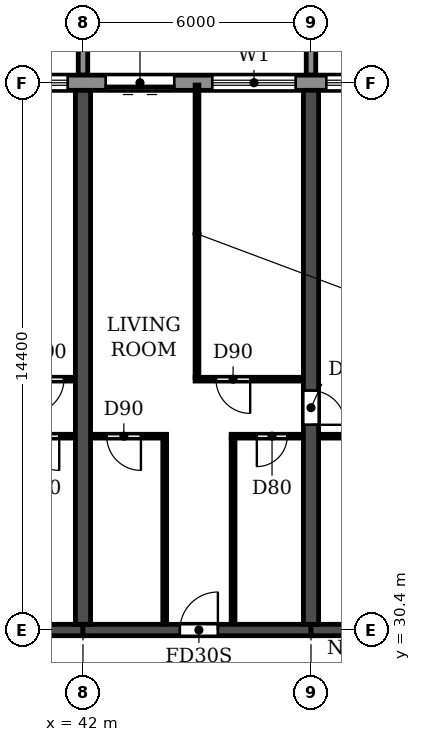
"""IFC4 building model, lengths in metres.
Left out: names, types, materials, properties, quantities, classifications, styles, units other than length and angle.
Written with IfcOpenShell. Run it as: python <this file> out.ifc"""

import sys

from ifc_helpers import new_model, si_unit, direction, frame, frame_2d, origin, place, context, subcontext, project, spatial, polyline, rectangle, outline, extrude, source, transform, mapped, element, fill, save


model = new_model("IFC4")
c1 = context("Model", 3, precision=1e-05, world=origin(), true_north=direction((0.0, 1.0)))
c2 = subcontext(c1, "Body", "Model", "MODEL_VIEW")
j1 = project(units=[si_unit("LENGTHUNIT", "METRE"), si_unit("PLANEANGLEUNIT", "RADIAN")], contexts=[c1])
p1 = place(None, origin())
s1 = spatial("IfcSite", under=j1, at=p1, CompositionType="ELEMENT")
p2 = place(p1, origin())
s2 = spatial("IfcBuilding", under=s1, at=p2, CompositionType="ELEMENT")
p3 = place(p2, frame((0.0, 0.0, 56.4)))
s3 = spatial("IfcBuildingStorey", under=s2, at=p3, CompositionType="ELEMENT", Elevation=56.4)
p4 = place(p3, frame((42.0, 30.55, 0.0), z_axis=(0.0, 0.0, 1.0), x_axis=(0.0, 1.0, 0.0)))
e1 = element("IfcWall", 1, at=p4, inside=s3, PredefinedType="SHEAR", context=c2, shape_type="SweptSolid", body=[
    extrude(rectangle(XDim=14.05, YDim=0.4, at=frame_2d((7.025, 0.0))), origin(), (0.0, 0.0, 1.0), 3.05),
])
p5 = place(p3, frame((48.0, 30.55, 0.0), z_axis=(0.0, 0.0, 1.0), x_axis=(0.0, 1.0, 0.0)))
e2 = element("IfcWall", 2, at=p5, inside=s3, PredefinedType="SHEAR", context=c2, shape_type="SweptSolid", body=[
    extrude(rectangle(XDim=14.05, YDim=0.4, at=frame_2d((7.025, 0.0))), origin(), (0.0, 0.0, 1.0), 3.05),
])
p6 = place(p5, frame((5.25, 0.0, 0.0)))
e3 = element("IfcOpeningElement", 3, at=p6, cuts=e2, PredefinedType="OPENING", context=c2, shape_type="SweptSolid", body=[
    extrude(rectangle(XDim=0.9, YDim=2.1, at=frame_2d((0.45, 1.05))), frame((0.0, 0.21, 0.0), z_axis=(0.0, -1.0, 0.0), x_axis=(1.0, 0.0, 0.0)), (0.0, 0.0, 1.0), 0.42),
])
p7 = place(p3, frame((36.0, 30.4, 0.0), z_axis=(0.0, 0.0, 1.0), x_axis=(1.0, 0.0, 0.0)))
e4 = element("IfcWall", 4, at=p7, inside=s3, PredefinedType="SHEAR", context=c2, shape_type="SweptSolid", body=[
    extrude(rectangle(XDim=6.0, YDim=0.3, at=frame_2d((3.0, 0.0))), origin(), (0.0, 0.0, 1.0), 2.45),
])
p8 = place(p7, frame((2.45, 0.0, 0.0)))
e5 = element("IfcOpeningElement", 5, at=p8, cuts=e4, PredefinedType="OPENING", context=c2, shape_type="SweptSolid", body=[
    extrude(rectangle(XDim=1.0, YDim=2.1, at=frame_2d((0.5, 1.05))), frame((0.0, 0.16, 0.0), z_axis=(0.0, -1.0, 0.0), x_axis=(1.0, 0.0, 0.0)), (0.0, 0.0, 1.0), 0.32),
])
p9 = place(p3, frame((42.0, 30.4, 0.0), z_axis=(0.0, 0.0, 1.0), x_axis=(1.0, 0.0, 0.0)))
e6 = element("IfcWall", 6, at=p9, inside=s3, PredefinedType="SHEAR", context=c2, shape_type="SweptSolid", body=[
    extrude(rectangle(XDim=6.0, YDim=0.3, at=frame_2d((3.0, 0.0))), origin(), (0.0, 0.0, 1.0), 2.45),
])
p10 = place(p9, frame((2.55, 0.0, 0.0)))
e7 = element("IfcOpeningElement", 7, at=p10, cuts=e6, PredefinedType="OPENING", context=c2, shape_type="SweptSolid", body=[
    extrude(rectangle(XDim=1.0, YDim=2.1, at=frame_2d((0.5, 1.05))), frame((0.0, 0.16, 0.0), z_axis=(0.0, -1.0, 0.0), x_axis=(1.0, 0.0, 0.0)), (0.0, 0.0, 1.0), 0.32),
])
p11 = place(p3, frame((48.0, 30.4, 0.0), z_axis=(0.0, 0.0, 1.0), x_axis=(1.0, 0.0, 0.0)))
e8 = element("IfcWall", 8, at=p11, inside=s3, PredefinedType="SHEAR", context=c2, shape_type="SweptSolid", body=[
    extrude(rectangle(XDim=6.0, YDim=0.3, at=frame_2d((3.0, 0.0))), origin(), (0.0, 0.0, 1.0), 2.45),
])
p12 = place(p3, frame((91.317, 44.8, 0.0), z_axis=(0.0, 0.0, 1.0), x_axis=(-1.0, 0.0, 0.0)))
e9 = element("IfcWall", 9, at=p12, inside=s3, PredefinedType="STANDARD", context=c2, shape_type="SweptSolid", body=[
    extrude(rectangle(XDim=80.634, YDim=0.4, at=frame_2d((40.317, 0.0))), origin(), (0.0, 0.0, 1.0), 3.05),
])
p13 = place(p12, frame((76.717, 0.0, 0.9)))
e10 = element("IfcOpeningElement", 10, at=p13, cuts=e9, PredefinedType="OPENING", context=c2, shape_type="SweptSolid", body=[
    extrude(rectangle(XDim=2.2, YDim=1.5, at=frame_2d((1.1, 0.75))), frame((0.0, 0.21, 0.0), z_axis=(0.0, -1.0, 0.0), x_axis=(1.0, 0.0, 0.0)), (0.0, 0.0, 1.0), 0.42),
])
p14 = place(p12, frame((73.917, 0.0, 0.0)))
e11 = element("IfcOpeningElement", 11, at=p14, cuts=e9, PredefinedType="OPENING", context=c2, shape_type="SweptSolid", body=[
    extrude(rectangle(XDim=1.8, YDim=2.4, at=frame_2d((0.9, 1.2))), frame((0.0, 0.21, 0.0), z_axis=(0.0, -1.0, 0.0), x_axis=(1.0, 0.0, 0.0)), (0.0, 0.0, 1.0), 0.42),
])
p15 = place(p12, frame((70.717, 0.0, 0.9)))
e12 = element("IfcOpeningElement", 12, at=p15, cuts=e9, PredefinedType="OPENING", context=c2, shape_type="SweptSolid", body=[
    extrude(rectangle(XDim=2.2, YDim=1.5, at=frame_2d((1.1, 0.75))), frame((0.0, 0.21, 0.0), z_axis=(0.0, -1.0, 0.0), x_axis=(1.0, 0.0, 0.0)), (0.0, 0.0, 1.0), 0.42),
])
p16 = place(p12, frame((67.917, 0.0, 0.0)))
e13 = element("IfcOpeningElement", 13, at=p16, cuts=e9, PredefinedType="OPENING", context=c2, shape_type="SweptSolid", body=[
    extrude(rectangle(XDim=1.8, YDim=2.4, at=frame_2d((0.9, 1.2))), frame((0.0, 0.21, 0.0), z_axis=(0.0, -1.0, 0.0), x_axis=(1.0, 0.0, 0.0)), (0.0, 0.0, 1.0), 0.42),
])
p17 = place(p12, frame((64.717, 0.0, 0.9)))
e14 = element("IfcOpeningElement", 14, at=p17, cuts=e9, PredefinedType="OPENING", context=c2, shape_type="SweptSolid", body=[
    extrude(rectangle(XDim=2.2, YDim=1.5, at=frame_2d((1.1, 0.75))), frame((0.0, 0.21, 0.0), z_axis=(0.0, -1.0, 0.0), x_axis=(1.0, 0.0, 0.0)), (0.0, 0.0, 1.0), 0.42),
])
p18 = place(p12, frame((61.917, 0.0, 0.0)))
e15 = element("IfcOpeningElement", 15, at=p18, cuts=e9, PredefinedType="OPENING", context=c2, shape_type="SweptSolid", body=[
    extrude(rectangle(XDim=1.8, YDim=2.4, at=frame_2d((0.9, 1.2))), frame((0.0, 0.21, 0.0), z_axis=(0.0, -1.0, 0.0), x_axis=(1.0, 0.0, 0.0)), (0.0, 0.0, 1.0), 0.42),
])
p19 = place(p12, frame((58.717, 0.0, 0.9)))
e16 = element("IfcOpeningElement", 16, at=p19, cuts=e9, PredefinedType="OPENING", context=c2, shape_type="SweptSolid", body=[
    extrude(rectangle(XDim=2.2, YDim=1.5, at=frame_2d((1.1, 0.75))), frame((0.0, 0.21, 0.0), z_axis=(0.0, -1.0, 0.0), x_axis=(1.0, 0.0, 0.0)), (0.0, 0.0, 1.0), 0.42),
])
p20 = place(p12, frame((55.717, 0.0, 0.9)))
e17 = element("IfcOpeningElement", 17, at=p20, cuts=e9, PredefinedType="OPENING", context=c2, shape_type="SweptSolid", body=[
    extrude(rectangle(XDim=2.2, YDim=1.5, at=frame_2d((1.1, 0.75))), frame((0.0, 0.21, 0.0), z_axis=(0.0, -1.0, 0.0), x_axis=(1.0, 0.0, 0.0)), (0.0, 0.0, 1.0), 0.42),
])
p21 = place(p12, frame((52.917, 0.0, 0.0)))
e18 = element("IfcOpeningElement", 18, at=p21, cuts=e9, PredefinedType="OPENING", context=c2, shape_type="SweptSolid", body=[
    extrude(rectangle(XDim=1.8, YDim=2.4, at=frame_2d((0.9, 1.2))), frame((0.0, 0.21, 0.0), z_axis=(0.0, -1.0, 0.0), x_axis=(1.0, 0.0, 0.0)), (0.0, 0.0, 1.0), 0.42),
])
p22 = place(p12, frame((49.717, 0.0, 0.9)))
e19 = element("IfcOpeningElement", 19, at=p22, cuts=e9, PredefinedType="OPENING", context=c2, shape_type="SweptSolid", body=[
    extrude(rectangle(XDim=2.2, YDim=1.5, at=frame_2d((1.1, 0.75))), frame((0.0, 0.21, 0.0), z_axis=(0.0, -1.0, 0.0), x_axis=(1.0, 0.0, 0.0)), (0.0, 0.0, 1.0), 0.42),
])
p23 = place(p12, frame((46.917, 0.0, 0.0)))
e20 = element("IfcOpeningElement", 20, at=p23, cuts=e9, PredefinedType="OPENING", context=c2, shape_type="SweptSolid", body=[
    extrude(rectangle(XDim=1.8, YDim=2.4, at=frame_2d((0.9, 1.2))), frame((0.0, 0.21, 0.0), z_axis=(0.0, -1.0, 0.0), x_axis=(1.0, 0.0, 0.0)), (0.0, 0.0, 1.0), 0.42),
])
p24 = place(p12, frame((43.717, 0.0, 0.9)))
e21 = element("IfcOpeningElement", 21, at=p24, cuts=e9, PredefinedType="OPENING", context=c2, shape_type="SweptSolid", body=[
    extrude(rectangle(XDim=2.2, YDim=1.5, at=frame_2d((1.1, 0.75))), frame((0.0, 0.21, 0.0), z_axis=(0.0, -1.0, 0.0), x_axis=(1.0, 0.0, 0.0)), (0.0, 0.0, 1.0), 0.42),
])
p25 = place(p12, frame((40.717, 0.0, 0.9)))
e22 = element("IfcOpeningElement", 22, at=p25, cuts=e9, PredefinedType="OPENING", context=c2, shape_type="SweptSolid", body=[
    extrude(rectangle(XDim=2.2, YDim=1.5, at=frame_2d((1.1, 0.75))), frame((0.0, 0.21, 0.0), z_axis=(0.0, -1.0, 0.0), x_axis=(1.0, 0.0, 0.0)), (0.0, 0.0, 1.0), 0.42),
])
p26 = place(p12, frame((37.717, 0.0, 0.9)))
e23 = element("IfcOpeningElement", 23, at=p26, cuts=e9, PredefinedType="OPENING", context=c2, shape_type="SweptSolid", body=[
    extrude(rectangle(XDim=2.2, YDim=1.5, at=frame_2d((1.1, 0.75))), frame((0.0, 0.21, 0.0), z_axis=(0.0, -1.0, 0.0), x_axis=(1.0, 0.0, 0.0)), (0.0, 0.0, 1.0), 0.42),
])
p27 = place(p12, frame((34.717, 0.0, 0.9)))
e24 = element("IfcOpeningElement", 24, at=p27, cuts=e9, PredefinedType="OPENING", context=c2, shape_type="SweptSolid", body=[
    extrude(rectangle(XDim=2.2, YDim=1.5, at=frame_2d((1.1, 0.75))), frame((0.0, 0.21, 0.0), z_axis=(0.0, -1.0, 0.0), x_axis=(1.0, 0.0, 0.0)), (0.0, 0.0, 1.0), 0.42),
])
p28 = place(p12, frame((31.917, 0.0, 0.0)))
e25 = element("IfcOpeningElement", 25, at=p28, cuts=e9, PredefinedType="OPENING", context=c2, shape_type="SweptSolid", body=[
    extrude(rectangle(XDim=1.8, YDim=2.4, at=frame_2d((0.9, 1.2))), frame((0.0, 0.21, 0.0), z_axis=(0.0, -1.0, 0.0), x_axis=(1.0, 0.0, 0.0)), (0.0, 0.0, 1.0), 0.42),
])
p29 = place(p12, frame((28.917, 0.0, 0.0)))
e26 = element("IfcOpeningElement", 26, at=p29, cuts=e9, PredefinedType="OPENING", context=c2, shape_type="SweptSolid", body=[
    extrude(rectangle(XDim=1.8, YDim=2.4, at=frame_2d((0.9, 1.2))), frame((0.0, 0.21, 0.0), z_axis=(0.0, -1.0, 0.0), x_axis=(1.0, 0.0, 0.0)), (0.0, 0.0, 1.0), 0.42),
])
p30 = place(p12, frame((25.717, 0.0, 0.9)))
e27 = element("IfcOpeningElement", 27, at=p30, cuts=e9, PredefinedType="OPENING", context=c2, shape_type="SweptSolid", body=[
    extrude(rectangle(XDim=2.2, YDim=1.5, at=frame_2d((1.1, 0.75))), frame((0.0, 0.21, 0.0), z_axis=(0.0, -1.0, 0.0), x_axis=(1.0, 0.0, 0.0)), (0.0, 0.0, 1.0), 0.42),
])
p31 = place(p12, frame((22.917, 0.0, 0.0)))
e28 = element("IfcOpeningElement", 28, at=p31, cuts=e9, PredefinedType="OPENING", context=c2, shape_type="SweptSolid", body=[
    extrude(rectangle(XDim=1.8, YDim=2.4, at=frame_2d((0.9, 1.2))), frame((0.0, 0.21, 0.0), z_axis=(0.0, -1.0, 0.0), x_axis=(1.0, 0.0, 0.0)), (0.0, 0.0, 1.0), 0.42),
])
p32 = place(p12, frame((19.717, 0.0, 0.9)))
e29 = element("IfcOpeningElement", 29, at=p32, cuts=e9, PredefinedType="OPENING", context=c2, shape_type="SweptSolid", body=[
    extrude(rectangle(XDim=2.2, YDim=1.5, at=frame_2d((1.1, 0.75))), frame((0.0, 0.21, 0.0), z_axis=(0.0, -1.0, 0.0), x_axis=(1.0, 0.0, 0.0)), (0.0, 0.0, 1.0), 0.42),
])
p33 = place(p12, frame((16.917, 0.0, 0.0)))
e30 = element("IfcOpeningElement", 30, at=p33, cuts=e9, PredefinedType="OPENING", context=c2, shape_type="SweptSolid", body=[
    extrude(rectangle(XDim=1.8, YDim=2.4, at=frame_2d((0.9, 1.2))), frame((0.0, 0.21, 0.0), z_axis=(0.0, -1.0, 0.0), x_axis=(1.0, 0.0, 0.0)), (0.0, 0.0, 1.0), 0.42),
])
p34 = place(p12, frame((13.717, 0.0, 0.9)))
e31 = element("IfcOpeningElement", 31, at=p34, cuts=e9, PredefinedType="OPENING", context=c2, shape_type="SweptSolid", body=[
    extrude(rectangle(XDim=2.2, YDim=1.5, at=frame_2d((1.1, 0.75))), frame((0.0, 0.21, 0.0), z_axis=(0.0, -1.0, 0.0), x_axis=(1.0, 0.0, 0.0)), (0.0, 0.0, 1.0), 0.42),
])
p35 = place(p12, frame((10.917, 0.0, 0.0)))
e32 = element("IfcOpeningElement", 32, at=p35, cuts=e9, PredefinedType="OPENING", context=c2, shape_type="SweptSolid", body=[
    extrude(rectangle(XDim=1.8, YDim=2.4, at=frame_2d((0.9, 1.2))), frame((0.0, 0.21, 0.0), z_axis=(0.0, -1.0, 0.0), x_axis=(1.0, 0.0, 0.0)), (0.0, 0.0, 1.0), 0.42),
])
p36 = place(p12, frame((7.717, 0.0, 0.9)))
e33 = element("IfcOpeningElement", 33, at=p36, cuts=e9, PredefinedType="OPENING", context=c2, shape_type="SweptSolid", body=[
    extrude(rectangle(XDim=2.2, YDim=1.5, at=frame_2d((1.1, 0.75))), frame((0.0, 0.21, 0.0), z_axis=(0.0, -1.0, 0.0), x_axis=(1.0, 0.0, 0.0)), (0.0, 0.0, 1.0), 0.42),
])
p37 = place(p12, frame((4.717, 0.0, 0.9)))
e34 = element("IfcOpeningElement", 34, at=p37, cuts=e9, PredefinedType="OPENING", context=c2, shape_type="SweptSolid", body=[
    extrude(rectangle(XDim=2.2, YDim=1.5, at=frame_2d((1.1, 0.75))), frame((0.0, 0.21, 0.0), z_axis=(0.0, -1.0, 0.0), x_axis=(1.0, 0.0, 0.0)), (0.0, 0.0, 1.0), 0.42),
])
p38 = place(p12, frame((1.717, 0.0, 0.9)))
e35 = element("IfcOpeningElement", 35, at=p38, cuts=e9, PredefinedType="OPENING", context=c2, shape_type="SweptSolid", body=[
    extrude(rectangle(XDim=2.2, YDim=1.5, at=frame_2d((1.1, 0.75))), frame((0.0, 0.21, 0.0), z_axis=(0.0, -1.0, 0.0), x_axis=(1.0, 0.0, 0.0)), (0.0, 0.0, 1.0), 0.42),
])
m1 = source(origin(), c2, "Body", "SweptSolid", [
    extrude(outline(polyline([(0.0, 0.0), (0.25, 0.0), (0.25, 3.1), (0.0, 3.1), (0.0, 0.0)])), origin(), (0.0, 0.0, 1.0), 3.1),
])
for number, where in (
    (36, (41.875, 45.0, 0.0)),
    (37, (47.875, 45.0, 0.0)),
):
    element("IfcWall", number, at=place(p3, frame(where)), inside=s3, PredefinedType="STANDARD", context=c2, shape_type="MappedRepresentation", body=[
        mapped(m1, transform((0.0, 0.0, 0.0))),
    ])
p39 = place(p3, frame((39.8, 35.5, 0.0), z_axis=(0.0, 0.0, 1.0), x_axis=(1.0, 0.0, 0.0)))
e38 = element("IfcWall", 38, at=p39, inside=s3, PredefinedType="PARTITIONING", context=c2, shape_type="SweptSolid", body=[
    extrude(rectangle(XDim=1.99, YDim=0.1, at=frame_2d((0.995, 0.0))), origin(), (0.0, 0.0, 1.0), 3.05),
])
p40 = place(p39, frame((0.675, 0.0, 0.0)))
e39 = element("IfcOpeningElement", 39, at=p40, cuts=e38, PredefinedType="OPENING", context=c2, shape_type="SweptSolid", body=[
    extrude(rectangle(XDim=0.9, YDim=2.1, at=frame_2d((0.45, 1.05))), frame((0.0, 0.06, 0.0), z_axis=(0.0, -1.0, 0.0), x_axis=(1.0, 0.0, 0.0)), (0.0, 0.0, 1.0), 0.12),
])
p41 = place(p3, frame((42.21, 35.5, 0.0), z_axis=(0.0, 0.0, 1.0), x_axis=(1.0, 0.0, 0.0)))
e40 = element("IfcWall", 40, at=p41, inside=s3, PredefinedType="PARTITIONING", context=c2, shape_type="SweptSolid", body=[
    extrude(rectangle(XDim=1.99, YDim=0.1, at=frame_2d((0.995, 0.0))), origin(), (0.0, 0.0, 1.0), 3.05),
])
p42 = place(p41, frame((0.415, 0.0, 0.0)))
e41 = element("IfcOpeningElement", 41, at=p42, cuts=e40, PredefinedType="OPENING", context=c2, shape_type="SweptSolid", body=[
    extrude(rectangle(XDim=0.9, YDim=2.1, at=frame_2d((0.45, 1.05))), frame((0.0, 0.06, 0.0), z_axis=(0.0, -1.0, 0.0), x_axis=(1.0, 0.0, 0.0)), (0.0, 0.0, 1.0), 0.12),
])
p43 = place(p3, frame((45.9, 35.5, 0.0), z_axis=(0.0, 0.0, 1.0), x_axis=(1.0, 0.0, 0.0)))
e42 = element("IfcWall", 42, at=p43, inside=s3, PredefinedType="PARTITIONING", context=c2, shape_type="SweptSolid", body=[
    extrude(rectangle(XDim=1.89, YDim=0.1, at=frame_2d((0.945, 0.0))), origin(), (0.0, 0.0, 1.0), 3.05),
])
p44 = place(p43, frame((0.675, 0.0, 0.0)))
e43 = element("IfcOpeningElement", 43, at=p44, cuts=e42, PredefinedType="OPENING", context=c2, shape_type="SweptSolid", body=[
    extrude(rectangle(XDim=0.8, YDim=2.1, at=frame_2d((0.4, 1.05))), frame((0.0, 0.06, 0.0), z_axis=(0.0, -1.0, 0.0), x_axis=(1.0, 0.0, 0.0)), (0.0, 0.0, 1.0), 0.12),
])
p45 = place(p3, frame((48.21, 35.5, 0.0), z_axis=(0.0, 0.0, 1.0), x_axis=(1.0, 0.0, 0.0)))
e44 = element("IfcWall", 44, at=p45, inside=s3, PredefinedType="PARTITIONING", context=c2, shape_type="SweptSolid", body=[
    extrude(rectangle(XDim=2.69, YDim=0.1, at=frame_2d((1.345, 0.0))), origin(), (0.0, 0.0, 1.0), 3.05),
])
p46 = place(p45, frame((0.89, 0.0, 0.0)))
e45 = element("IfcOpeningElement", 45, at=p46, cuts=e44, PredefinedType="OPENING", context=c2, shape_type="SweptSolid", body=[
    extrude(rectangle(XDim=0.8, YDim=2.1, at=frame_2d((0.4, 1.05))), frame((0.0, 0.06, 0.0), z_axis=(0.0, -1.0, 0.0), x_axis=(1.0, 0.0, 0.0)), (0.0, 0.0, 1.0), 0.12),
])
p47 = place(p3, frame((38.95, 37.0, 0.0), z_axis=(0.0, 0.0, 1.0), x_axis=(1.0, 0.0, 0.0)))
e46 = element("IfcWall", 46, at=p47, inside=s3, PredefinedType="PARTITIONING", context=c2, shape_type="SweptSolid", body=[
    extrude(rectangle(XDim=2.84, YDim=0.1, at=frame_2d((1.42, 0.0))), origin(), (0.0, 0.0, 1.0), 3.05),
])
p48 = place(p47, frame((1.65, 0.0, 0.0)))
e47 = element("IfcOpeningElement", 47, at=p48, cuts=e46, PredefinedType="OPENING", context=c2, shape_type="SweptSolid", body=[
    extrude(rectangle(XDim=0.9, YDim=2.1, at=frame_2d((0.45, 1.05))), frame((0.0, 0.06, 0.0), z_axis=(0.0, -1.0, 0.0), x_axis=(1.0, 0.0, 0.0)), (0.0, 0.0, 1.0), 0.12),
])
p49 = place(p3, frame((44.95, 37.0, 0.0), z_axis=(0.0, 0.0, 1.0), x_axis=(1.0, 0.0, 0.0)))
e48 = element("IfcWall", 48, at=p49, inside=s3, PredefinedType="PARTITIONING", context=c2, shape_type="SweptSolid", body=[
    extrude(rectangle(XDim=2.84, YDim=0.1, at=frame_2d((1.42, 0.0))), origin(), (0.0, 0.0, 1.0), 3.05),
])
p50 = place(p49, frame((0.55, 0.0, 0.0)))
e49 = element("IfcOpeningElement", 49, at=p50, cuts=e48, PredefinedType="OPENING", context=c2, shape_type="SweptSolid", body=[
    extrude(rectangle(XDim=0.9, YDim=2.1, at=frame_2d((0.45, 1.05))), frame((0.0, 0.06, 0.0), z_axis=(0.0, -1.0, 0.0), x_axis=(1.0, 0.0, 0.0)), (0.0, 0.0, 1.0), 0.12),
])
p51 = place(p3, frame((44.15, 30.56, 0.0), z_axis=(0.0, 0.0, 1.0), x_axis=(0.0, 1.0, 0.0)))
e50 = element("IfcWall", 50, at=p51, inside=s3, PredefinedType="PARTITIONING", context=c2, shape_type="SweptSolid", body=[
    extrude(rectangle(XDim=4.89, YDim=0.1, at=frame_2d((2.445, 0.0))), origin(), (0.0, 0.0, 1.0), 3.05),
])
p52 = place(p3, frame((45.0, 37.05, 0.0), z_axis=(0.0, 0.0, 1.0), x_axis=(0.0, 1.0, 0.0)))
e51 = element("IfcWall", 51, at=p52, inside=s3, PredefinedType="PARTITIONING", context=c2, shape_type="SweptSolid", body=[
    extrude(rectangle(XDim=7.69, YDim=0.1, at=frame_2d((3.845, 0.0))), origin(), (0.0, 0.0, 1.0), 3.05),
])
p53 = place(p3, frame((45.95, 30.56, 0.0), z_axis=(0.0, 0.0, 1.0), x_axis=(0.0, 1.0, 0.0)))
e52 = element("IfcWall", 52, at=p53, inside=s3, PredefinedType="PARTITIONING", context=c2, shape_type="SweptSolid", body=[
    extrude(rectangle(XDim=4.89, YDim=0.1, at=frame_2d((2.445, 0.0))), origin(), (0.0, 0.0, 1.0), 3.05),
])
p54 = place(p22, origin())
e53 = element("IfcWindow", 53, at=p54, inside=s3, PartitioningType="DOUBLE_PANEL_HORIZONTAL", PredefinedType="WINDOW", context=c2, shape_type="SweptSolid", body=[
    extrude(rectangle(XDim=2.2, YDim=1.5, at=frame_2d((1.1, 0.75))), frame((0.0, 0.03, 0.0), z_axis=(0.0, -1.0, 0.0), x_axis=(1.0, 0.0, 0.0)), (0.0, 0.0, 1.0), 0.06),
])
fill(e19, e53)
p55 = place(p23, origin())
e54 = element("IfcDoor", 54, at=p55, inside=s3, OperationType="DOUBLE_DOOR_SLIDING", PredefinedType="DOOR", context=c2, shape_type="SweptSolid", body=[
    extrude(rectangle(XDim=1.8, YDim=2.4, at=frame_2d((0.9, 1.2))), frame((0.0, 0.025, 0.0), z_axis=(0.0, -1.0, 0.0), x_axis=(1.0, 0.0, 0.0)), (0.0, 0.0, 1.0), 0.05),
])
fill(e20, e54)
p56 = place(p24, origin())
e55 = element("IfcWindow", 55, at=p56, inside=s3, PartitioningType="DOUBLE_PANEL_HORIZONTAL", PredefinedType="WINDOW", context=c2, shape_type="SweptSolid", body=[
    extrude(rectangle(XDim=2.2, YDim=1.5, at=frame_2d((1.1, 0.75))), frame((0.0, 0.03, 0.0), z_axis=(0.0, -1.0, 0.0), x_axis=(1.0, 0.0, 0.0)), (0.0, 0.0, 1.0), 0.06),
])
fill(e21, e55)
p57 = place(p25, origin())
e56 = element("IfcWindow", 56, at=p57, inside=s3, PartitioningType="DOUBLE_PANEL_HORIZONTAL", PredefinedType="WINDOW", context=c2, shape_type="SweptSolid", body=[
    extrude(rectangle(XDim=2.2, YDim=1.5, at=frame_2d((1.1, 0.75))), frame((0.0, 0.03, 0.0), z_axis=(0.0, -1.0, 0.0), x_axis=(1.0, 0.0, 0.0)), (0.0, 0.0, 1.0), 0.06),
])
fill(e22, e56)
p58 = place(p40, frame((0.9, 0.0, 0.0), z_axis=(0.0, 0.0, 1.0), x_axis=(-1.0, 0.0, 0.0)))
e57 = element("IfcDoor", 57, at=p58, inside=s3, OperationType="SINGLE_SWING_LEFT", PredefinedType="DOOR", context=c2, shape_type="SweptSolid", body=[
    extrude(rectangle(XDim=0.9, YDim=2.1, at=frame_2d((0.45, 1.05))), frame((0.0, 0.025, 0.0), z_axis=(0.0, -1.0, 0.0), x_axis=(1.0, 0.0, 0.0)), (0.0, 0.0, 1.0), 0.05),
])
fill(e39, e57)
p59 = place(p48, frame((0.9, 0.0, 0.0), z_axis=(0.0, 0.0, 1.0), x_axis=(-1.0, 0.0, 0.0)))
e58 = element("IfcDoor", 58, at=p59, inside=s3, OperationType="SINGLE_SWING_RIGHT", PredefinedType="DOOR", context=c2, shape_type="SweptSolid", body=[
    extrude(rectangle(XDim=0.9, YDim=2.1, at=frame_2d((0.45, 1.05))), frame((0.0, 0.025, 0.0), z_axis=(0.0, -1.0, 0.0), x_axis=(1.0, 0.0, 0.0)), (0.0, 0.0, 1.0), 0.05),
])
fill(e47, e58)
p60 = place(p42, frame((0.9, 0.0, 0.0), z_axis=(0.0, 0.0, 1.0), x_axis=(-1.0, 0.0, 0.0)))
e59 = element("IfcDoor", 59, at=p60, inside=s3, OperationType="SINGLE_SWING_LEFT", PredefinedType="DOOR", context=c2, shape_type="SweptSolid", body=[
    extrude(rectangle(XDim=0.9, YDim=2.1, at=frame_2d((0.45, 1.05))), frame((0.0, 0.025, 0.0), z_axis=(0.0, -1.0, 0.0), x_axis=(1.0, 0.0, 0.0)), (0.0, 0.0, 1.0), 0.05),
])
fill(e41, e59)
p61 = place(p10, origin())
e60 = element("IfcDoor", 60, at=p61, inside=s3, OperationType="SINGLE_SWING_RIGHT", PredefinedType="DOOR", context=c2, shape_type="SweptSolid", body=[
    extrude(rectangle(XDim=1.0, YDim=2.1, at=frame_2d((0.5, 1.05))), frame((0.0, 0.025, 0.0), z_axis=(0.0, -1.0, 0.0), x_axis=(1.0, 0.0, 0.0)), (0.0, 0.0, 1.0), 0.05),
])
fill(e7, e60)
p62 = place(p50, frame((0.9, 0.0, 0.0), z_axis=(0.0, 0.0, 1.0), x_axis=(-1.0, 0.0, 0.0)))
e61 = element("IfcDoor", 61, at=p62, inside=s3, OperationType="SINGLE_SWING_LEFT", PredefinedType="DOOR", context=c2, shape_type="SweptSolid", body=[
    extrude(rectangle(XDim=0.9, YDim=2.1, at=frame_2d((0.45, 1.05))), frame((0.0, 0.025, 0.0), z_axis=(0.0, -1.0, 0.0), x_axis=(1.0, 0.0, 0.0)), (0.0, 0.0, 1.0), 0.05),
])
fill(e49, e61)
p63 = place(p44, frame((0.8, 0.0, 0.0), z_axis=(0.0, 0.0, 1.0), x_axis=(-1.0, 0.0, 0.0)))
e62 = element("IfcDoor", 62, at=p63, inside=s3, OperationType="SINGLE_SWING_RIGHT", PredefinedType="DOOR", context=c2, shape_type="SweptSolid", body=[
    extrude(rectangle(XDim=0.8, YDim=2.1, at=frame_2d((0.4, 1.05))), frame((0.0, 0.025, 0.0), z_axis=(0.0, -1.0, 0.0), x_axis=(1.0, 0.0, 0.0)), (0.0, 0.0, 1.0), 0.05),
])
fill(e43, e62)
p64 = place(p6, frame((0.9, 0.0, 0.0), z_axis=(0.0, 0.0, 1.0), x_axis=(-1.0, 0.0, 0.0)))
e63 = element("IfcDoor", 63, at=p64, inside=s3, OperationType="SINGLE_SWING_RIGHT", PredefinedType="DOOR", context=c2, shape_type="SweptSolid", body=[
    extrude(rectangle(XDim=0.9, YDim=2.1, at=frame_2d((0.45, 1.05))), frame((0.0, 0.025, 0.0), z_axis=(0.0, -1.0, 0.0), x_axis=(1.0, 0.0, 0.0)), (0.0, 0.0, 1.0), 0.05),
])
fill(e3, e63)
save(model, sys.argv[1])
